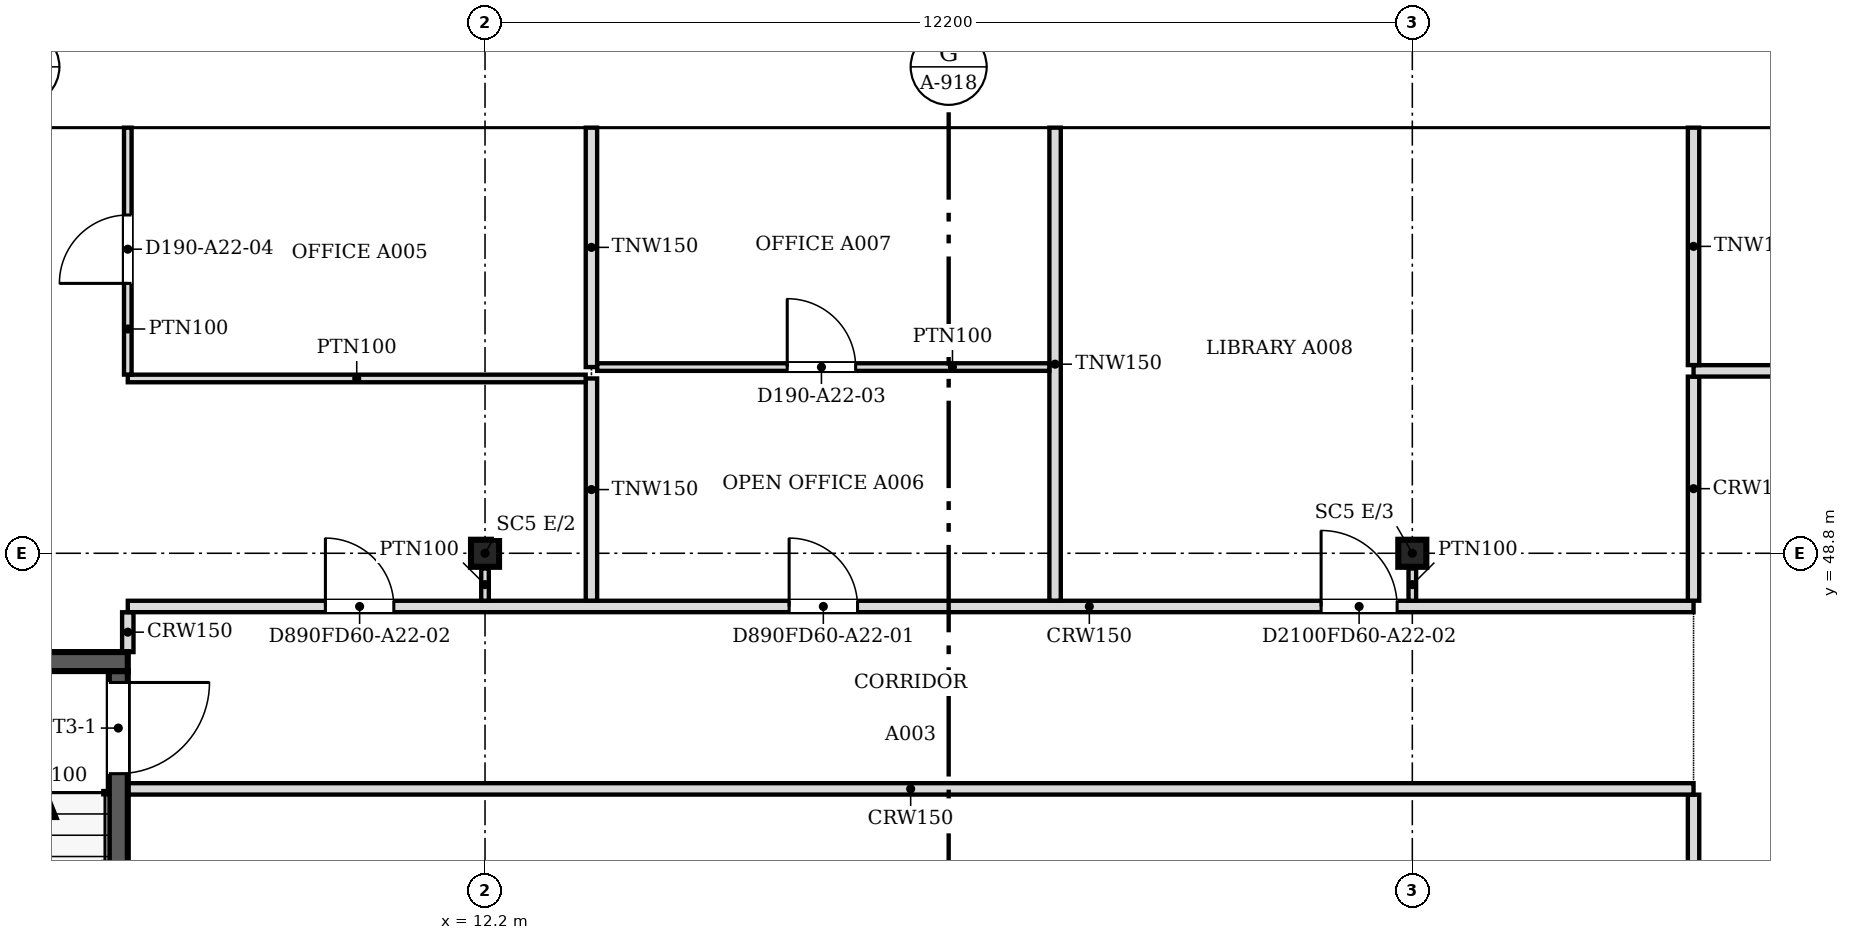
"""IFC4 building model, lengths in metres.
Left out: names, types, materials, properties, quantities, classifications, styles, units other than length and angle.
Written with IfcOpenShell. Run it as: python <this file> out.ifc"""

import sys

from ifc_helpers import new_model, si_unit, direction, frame, frame_2d, origin, origin_2d, place, context, subcontext, project, spatial, polyline, rectangle, i_section, outline, extrude, faceted_brep, source, transform, mapped, element, fill, save


model = new_model("IFC4")
c1 = context("Model", 3, precision=1e-05, world=origin(), true_north=direction((0.0, 1.0)))
c2 = subcontext(c1, "Body", "Model", "MODEL_VIEW")
j1 = project(units=[si_unit("LENGTHUNIT", "METRE"), si_unit("PLANEANGLEUNIT", "RADIAN")], contexts=[c1])
p1 = place(None, origin())
s1 = spatial("IfcSite", under=j1, at=p1, CompositionType="ELEMENT")
p2 = place(p1, origin())
s2 = spatial("IfcBuilding", under=s1, at=p2, CompositionType="ELEMENT")
p3 = place(p2, frame((0.0, 0.0, 252.1)))
s3 = spatial("IfcBuildingStorey", under=s2, at=p3, CompositionType="ELEMENT", Elevation=252.1)
for number, where, z_axis, x_axis in (
    (1, (12.2, 48.8, 0.0), (0.0, 0.0, 1.0), (1.0, 0.0, 0.0)),
    (2, (24.4, 48.8, 0.0), (0.0, 0.0, 1.0), (1.0, 0.0, 0.0)),
):
    element("IfcColumn", number, at=place(p3, frame(where, z_axis=z_axis, x_axis=x_axis)), inside=s3, PredefinedType="COLUMN", context=c2, shape_type="SweptSolid", body=[
        extrude(i_section(OverallWidth=0.369, OverallDepth=0.356, WebThickness=0.011, FlangeThickness=0.018, at=origin_2d()), origin(), (0.0, 0.0, 1.0), 3.6),
    ])
m1 = source(origin(), c2, "Body", "SweptSolid", [
    extrude(outline(polyline([(3.05, 0.0), (6.1, 3.8), (3.05, 7.6), (0.0, 3.8), (3.05, 0.0)])), frame((0.0, 0.25, 0.0), z_axis=(0.0, -1.0, 0.0), x_axis=(1.0, 0.0, 0.0)), (0.0, 0.0, 1.0), 0.5),
])
p4 = place(p3, frame((33.55, 54.65, -3.8), z_axis=(0.0, 0.0, 1.0), x_axis=(-1.0, 0.0, 0.0)))
e3 = element("IfcWall", 3, at=p4, inside=s3, PredefinedType="SOLIDWALL", context=c2, shape_type="MappedRepresentation", body=[
    mapped(m1, transform((0.0, 0.0, 0.0), scale=1.0)),
])
m2 = source(origin(), c2, "Body", "SweptSolid", [
    extrude(outline(polyline([(3.05, 0.399), (5.78, 3.8), (3.05, 7.2), (0.321, 3.8), (3.05, 0.399)])), frame((0.0, 0.26, 0.0), z_axis=(0.0, -1.0, 0.0), x_axis=(1.0, 0.0, 0.0)), (0.0, 0.0, 1.0), 0.52),
])
p5 = place(p4, origin())
e4 = element("IfcOpeningElement", 4, at=p5, cuts=e3, PredefinedType="OPENING", context=c2, shape_type="MappedRepresentation", body=[
    mapped(m2, transform((0.0, 0.0, 0.0), scale=1.0)),
])
m3 = source(origin(), c2, "Body", "Brep", [
    faceted_brep([(3.05, -0.25, 0.0), (6.1, -0.25, 3.8), (6.1, -0.25, 3.8), (3.05, -0.25, 7.6), (0.0, -0.25, 3.8), (0.0, 0.25, 3.8), (3.05, 0.25, 7.6), (6.1, 0.25, 3.8), (6.1, 0.25, 3.8), (3.05, 0.25, 0.0)], [[[0, 1, 2, 3, 4]], [[5, 6, 7, 8, 9]], [[9, 8, 1, 0]], [[7, 6, 3, 2]], [[6, 5, 4, 3]], [[5, 9, 0, 4]], [[1, 8, 7, 2]]]),
])
p6 = place(p3, frame((27.45, 54.65, -3.8), z_axis=(0.0, 0.0, 1.0), x_axis=(-1.0, 0.0, 0.0)))
e5 = element("IfcWall", 5, at=p6, inside=s3, PredefinedType="SOLIDWALL", context=c2, shape_type="MappedRepresentation", body=[
    mapped(m3, transform((0.0, 0.0, 0.0), scale=1.0)),
])
p7 = place(p6, origin())
e6 = element("IfcOpeningElement", 6, at=p7, cuts=e5, PredefinedType="OPENING", context=c2, shape_type="MappedRepresentation", body=[
    mapped(m2, transform((0.0, 0.0, 0.0), scale=1.0)),
])
p8 = place(p3, frame((21.35, 54.65, -3.8), z_axis=(0.0, 0.0, 1.0), x_axis=(-1.0, 0.0, 0.0)))
e7 = element("IfcWall", 7, at=p8, inside=s3, PredefinedType="SOLIDWALL", context=c2, shape_type="MappedRepresentation", body=[
    mapped(m1, transform((0.0, 0.0, 0.0), scale=1.0)),
])
p9 = place(p8, origin())
e8 = element("IfcOpeningElement", 8, at=p9, cuts=e7, PredefinedType="OPENING", context=c2, shape_type="MappedRepresentation", body=[
    mapped(m2, transform((0.0, 0.0, 0.0), scale=1.0)),
])
p10 = place(p3, frame((15.25, 54.65, -3.8), z_axis=(0.0, 0.0, 1.0), x_axis=(-1.0, 0.0, 0.0)))
e9 = element("IfcWall", 9, at=p10, inside=s3, PredefinedType="SOLIDWALL", context=c2, shape_type="MappedRepresentation", body=[
    mapped(m1, transform((0.0, 0.0, 0.0), scale=1.0)),
])
p11 = place(p10, origin())
e10 = element("IfcOpeningElement", 10, at=p11, cuts=e9, PredefinedType="OPENING", context=c2, shape_type="MappedRepresentation", body=[
    mapped(m2, transform((0.0, 0.0, 0.0), scale=1.0)),
])
m4 = source(origin(), c2, "Body", "Brep", [
    faceted_brep([(3.003, -0.25, 0.0), (3.05, -0.25, 0.06), (3.05, -0.25, 7.54), (3.003, -0.25, 7.6), (0.0, -0.25, 3.8), (0.0, 0.25, 3.8), (2.957, 0.25, 7.541), (2.957, 0.25, 0.059), (3.003, 0.0, 0.0), (3.003, 0.0, 7.6)], [[[0, 1, 2, 3, 4]], [[5, 6, 7]], [[1, 0, 8]], [[9, 3, 2]], [[6, 5, 4, 3, 9]], [[5, 7, 8, 0, 4]], [[1, 8, 7, 6, 9, 2]]]),
])
p12 = place(p3, frame((9.15, 54.65, -3.8), z_axis=(0.0, 0.0, 1.0), x_axis=(-1.0, 0.0, 0.0)))
e11 = element("IfcWall", 11, at=p12, inside=s3, PredefinedType="SOLIDWALL", context=c2, shape_type="MappedRepresentation", body=[
    mapped(m4, transform((0.0, 0.0, 0.0), scale=1.0)),
])
m5 = source(origin(), c2, "Body", "SweptSolid", [
    extrude(outline(polyline([(2.803, 6.944), (0.319, 3.8), (2.803, 0.656), (2.803, 6.944)])), frame((0.0, 0.26, 0.0), z_axis=(0.0, -1.0, 0.0), x_axis=(1.0, 0.0, 0.0)), (0.0, 0.0, 1.0), 0.52),
])
p13 = place(p12, origin())
e12 = element("IfcOpeningElement", 12, at=p13, cuts=e11, PredefinedType="OPENING", context=c2, shape_type="MappedRepresentation", body=[
    mapped(m5, transform((0.0, 0.0, 0.0), scale=1.0)),
])
p14 = place(p2, frame((0.0, 0.0, 255.9)))
s4 = spatial("IfcBuildingStorey", under=s2, at=p14, CompositionType="ELEMENT", Elevation=255.9)
m6 = source(origin(), c2, "Body", "SweptSolid", [
    extrude(outline(polyline([(3.05, 0.0), (6.1, 3.8), (3.05, 7.6), (0.0, 3.8), (3.05, 0.0)])), frame((0.0, 0.25, 0.0), z_axis=(0.0, -1.0, 0.0), x_axis=(1.0, 0.0, 0.0)), (0.0, 0.0, 1.0), 0.5),
])
p15 = place(p14, frame((30.5, 54.65, -3.8), z_axis=(0.0, 0.0, 1.0), x_axis=(-1.0, 0.0, 0.0)))
e13 = element("IfcWall", 13, at=p15, inside=s4, PredefinedType="SOLIDWALL", context=c2, shape_type="MappedRepresentation", body=[
    mapped(m6, transform((0.0, 0.0, 0.0), scale=1.0)),
])
m7 = source(origin(), c2, "Body", "SweptSolid", [
    extrude(outline(polyline([(3.05, 0.399), (5.78, 3.8), (3.05, 7.2), (0.321, 3.8), (3.05, 0.399)])), frame((0.0, 0.26, 0.0), z_axis=(0.0, -1.0, 0.0), x_axis=(1.0, 0.0, 0.0)), (0.0, 0.0, 1.0), 0.52),
])
p16 = place(p15, origin())
e14 = element("IfcOpeningElement", 14, at=p16, cuts=e13, PredefinedType="OPENING", context=c2, shape_type="MappedRepresentation", body=[
    mapped(m7, transform((0.0, 0.0, 0.0), scale=1.0)),
])
m8 = source(origin(), c2, "Body", "Brep", [
    faceted_brep([(3.05, -0.25, 0.0), (6.1, -0.25, 3.8), (6.1, -0.25, 3.8), (3.05, -0.25, 7.6), (0.0, -0.25, 3.8), (0.0, 0.25, 3.8), (3.05, 0.25, 7.6), (6.1, 0.25, 3.8), (6.1, 0.25, 3.8), (3.05, 0.25, 0.0)], [[[0, 1, 2, 3, 4]], [[5, 6, 7, 8, 9]], [[9, 8, 1, 0]], [[7, 6, 3, 2]], [[6, 5, 4, 3]], [[5, 9, 0, 4]], [[1, 8, 7, 2]]]),
])
p17 = place(p14, frame((24.4, 54.65, -3.8), z_axis=(0.0, 0.0, 1.0), x_axis=(-1.0, 0.0, 0.0)))
e15 = element("IfcWall", 15, at=p17, inside=s4, PredefinedType="SOLIDWALL", context=c2, shape_type="MappedRepresentation", body=[
    mapped(m8, transform((0.0, 0.0, 0.0), scale=1.0)),
])
p18 = place(p17, origin())
e16 = element("IfcOpeningElement", 16, at=p18, cuts=e15, PredefinedType="OPENING", context=c2, shape_type="MappedRepresentation", body=[
    mapped(m7, transform((0.0, 0.0, 0.0), scale=1.0)),
])
p19 = place(p14, frame((18.3, 54.65, -3.8), z_axis=(0.0, 0.0, 1.0), x_axis=(-1.0, 0.0, 0.0)))
e17 = element("IfcWall", 17, at=p19, inside=s4, PredefinedType="SOLIDWALL", context=c2, shape_type="MappedRepresentation", body=[
    mapped(m6, transform((0.0, 0.0, 0.0), scale=1.0)),
])
p20 = place(p19, origin())
e18 = element("IfcOpeningElement", 18, at=p20, cuts=e17, PredefinedType="OPENING", context=c2, shape_type="MappedRepresentation", body=[
    mapped(m7, transform((0.0, 0.0, 0.0), scale=1.0)),
])
m9 = source(origin(), c2, "Body", "Brep", [
    faceted_brep([(3.05, -0.25, 0.0), (6.053, -0.25, 3.8), (3.05, -0.25, 7.6), (0.0, -0.25, 3.8), (0.0, 0.25, 3.8), (3.05, 0.25, 7.6), (6.007, 0.25, 3.859), (6.007, 0.25, 3.741), (3.05, 0.25, 0.0), (6.053, 0.0, 3.8)], [[[0, 1, 2, 3]], [[4, 5, 6, 7, 8]], [[8, 7, 9, 1, 0]], [[6, 5, 2, 1, 9]], [[5, 4, 3, 2]], [[4, 8, 0, 3]], [[9, 7, 6]]]),
])
p21 = place(p14, frame((12.2, 54.65, -3.8), z_axis=(0.0, 0.0, 1.0), x_axis=(-1.0, 0.0, 0.0)))
e19 = element("IfcWall", 19, at=p21, inside=s4, PredefinedType="SOLIDWALL", context=c2, shape_type="MappedRepresentation", body=[
    mapped(m9, transform((0.0, 0.0, 0.0), scale=1.0)),
])
m10 = source(origin(), c2, "Body", "SweptSolid", [
    extrude(outline(polyline([(3.049, 0.401), (5.735, 3.8), (3.049, 7.199), (0.321, 3.8), (3.049, 0.401)])), frame((0.0, 0.26, 0.0), z_axis=(0.0, -1.0, 0.0), x_axis=(1.0, 0.0, 0.0)), (0.0, 0.0, 1.0), 0.52),
])
p22 = place(p21, origin())
e20 = element("IfcOpeningElement", 20, at=p22, cuts=e19, PredefinedType="OPENING", context=c2, shape_type="MappedRepresentation", body=[
    mapped(m10, transform((0.0, 0.0, 0.0), scale=1.0)),
])
p23 = place(p3, frame((3.6, 47.375, 0.0), z_axis=(0.0, 0.0, 1.0), x_axis=(1.0, 0.0, 0.0)))
e21 = element("IfcWall", 21, at=p23, inside=s3, PredefinedType="SOLIDWALL", context=c2, shape_type="SweptSolid", body=[
    extrude(rectangle(XDim=3.9, YDim=0.25, at=frame_2d((1.95, 0.0))), origin(), (0.0, 0.0, 1.0), 3.8),
])
p24 = place(p3, frame((7.375, 47.25, 0.0), z_axis=(0.0, 0.0, 1.0), x_axis=(0.0, -1.0, 0.0)))
e22 = element("IfcWall", 22, at=p24, inside=s3, PredefinedType="SOLIDWALL", context=c2, shape_type="SweptSolid", body=[
    extrude(rectangle(XDim=8.0, YDim=0.25, at=frame_2d((4.0, 0.0))), origin(), (0.0, 0.0, 1.0), 3.8),
])
m11 = source(origin(), c2, "Body", "SweptSolid", [
    extrude(rectangle(XDim=1.2, YDim=2.1, at=frame_2d((0.6, 1.05))), frame((0.0, 0.135, 0.0), z_axis=(0.0, -1.0, 0.0), x_axis=(1.0, 0.0, 0.0)), (0.0, 0.0, 1.0), 0.27),
])
p25 = place(p24, frame((0.15, 0.0, 0.0)))
e23 = element("IfcOpeningElement", 23, at=p25, cuts=e22, PredefinedType="OPENING", context=c2, shape_type="MappedRepresentation", body=[
    mapped(m11, transform((0.0, 0.0, 0.0), scale=1.0)),
])
p26 = place(p3, frame((28.1, 22.076, 0.0), z_axis=(0.0, 0.0, 1.0), x_axis=(0.0, 1.0, 0.0)))
e24 = element("IfcWall", 24, at=p26, inside=s3, PredefinedType="PARTITIONING", context=c2, shape_type="SweptSolid", body=[
    extrude(rectangle(XDim=23.548, YDim=0.15, at=frame_2d((11.774, 0.0))), origin(), (0.0, 0.0, 1.0), 3.067),
])
m12 = source(origin(), c2, "Body", "SweptSolid", [
    extrude(rectangle(XDim=1.0, YDim=2.1, at=frame_2d((0.5, 1.05))), frame((0.0, 0.085, 0.0), z_axis=(0.0, -1.0, 0.0), x_axis=(1.0, 0.0, 0.0)), (0.0, 0.0, 1.0), 0.17),
])
p27 = place(p26, frame((2.5, 0.0, 0.0)))
e25 = element("IfcOpeningElement", 25, at=p27, cuts=e24, PredefinedType="OPENING", context=c2, shape_type="MappedRepresentation", body=[
    mapped(m12, transform((0.0, 0.0, 0.0), scale=1.0)),
])
m13 = source(origin(), c2, "Body", "SweptSolid", [
    extrude(rectangle(XDim=0.9, YDim=2.1, at=frame_2d((0.45, 1.05))), frame((0.0, 0.085, 0.0), z_axis=(0.0, -1.0, 0.0), x_axis=(1.0, 0.0, 0.0)), (0.0, 0.0, 1.0), 0.17),
])
p28 = place(p26, frame((18.875, 0.0, 0.0)))
e26 = element("IfcOpeningElement", 26, at=p28, cuts=e24, PredefinedType="OPENING", context=c2, shape_type="MappedRepresentation", body=[
    mapped(m13, transform((0.0, 0.0, 0.0), scale=1.0)),
])
p29 = place(p26, frame((10.124, 0.0, 0.0)))
e27 = element("IfcOpeningElement", 27, at=p29, cuts=e24, PredefinedType="OPENING", context=c2, shape_type="MappedRepresentation", body=[
    mapped(m13, transform((0.0, 0.0, 0.0), scale=1.0)),
])
p30 = place(p3, frame((7.5, 45.7, 0.0), z_axis=(0.0, 0.0, 1.0), x_axis=(1.0, 0.0, 0.0)))
e28 = element("IfcWall", 28, at=p30, inside=s3, PredefinedType="PARTITIONING", context=c2, shape_type="SweptSolid", body=[
    extrude(rectangle(XDim=20.6, YDim=0.15, at=frame_2d((10.3, 0.0))), origin(), (0.0, 0.0, 1.0), 3.067),
])
p31 = place(p3, frame((7.5, 47.5, 0.0), z_axis=(0.0, 0.0, 1.0), x_axis=(0.0, 1.0, 0.0)))
e29 = element("IfcWall", 29, at=p31, inside=s3, PredefinedType="PARTITIONING", context=c2, shape_type="SweptSolid", body=[
    extrude(rectangle(XDim=0.524, YDim=0.15, at=frame_2d((0.262, 0.0))), origin(), (0.0, 0.0, 1.0), 3.067),
])
p32 = place(p3, frame((7.5, 48.1, 0.0), z_axis=(0.0, 0.0, 1.0), x_axis=(1.0, 0.0, 0.0)))
e30 = element("IfcWall", 30, at=p32, inside=s3, PredefinedType="PARTITIONING", context=c2, shape_type="SweptSolid", body=[
    extrude(rectangle(XDim=20.6, YDim=0.15, at=frame_2d((10.3, 0.0))), origin(), (0.0, 0.0, 1.0), 3.067),
])
p33 = place(p32, frame((8.701, 0.0, 0.0)))
e31 = element("IfcOpeningElement", 31, at=p33, cuts=e30, PredefinedType="OPENING", context=c2, shape_type="MappedRepresentation", body=[
    mapped(m13, transform((0.0, 0.0, 0.0), scale=1.0)),
])
p34 = place(p32, frame((2.6, 0.0, 0.0)))
e32 = element("IfcOpeningElement", 32, at=p34, cuts=e30, PredefinedType="OPENING", context=c2, shape_type="MappedRepresentation", body=[
    mapped(m13, transform((0.0, 0.0, 0.0), scale=1.0)),
])
p35 = place(p32, frame((15.7, 0.0, 0.0)))
e33 = element("IfcOpeningElement", 33, at=p35, cuts=e30, PredefinedType="OPENING", context=c2, shape_type="MappedRepresentation", body=[
    mapped(m12, transform((0.0, 0.0, 0.0), scale=1.0)),
])
p36 = place(p3, frame((13.6, 48.176, 0.0), z_axis=(0.0, 0.0, 1.0), x_axis=(0.0, 1.0, 0.0)))
e34 = element("IfcWall", 34, at=p36, inside=s3, PredefinedType="PARTITIONING", context=c2, shape_type="SweptSolid", body=[
    extrude(rectangle(XDim=2.924, YDim=0.15, at=frame_2d((1.462, 0.0))), origin(), (0.0, 0.0, 1.0), 3.067),
])
p37 = place(p3, frame((19.7, 48.176, 0.0), z_axis=(0.0, 0.0, 1.0), x_axis=(0.0, 1.0, 0.0)))
e35 = element("IfcWall", 35, at=p37, inside=s3, PredefinedType="PARTITIONING", context=c2, shape_type="SweptSolid", body=[
    extrude(rectangle(XDim=6.224, YDim=0.15, at=frame_2d((3.112, 0.0))), origin(), (0.0, 0.0, 1.0), 3.067),
])
p38 = place(p3, frame((28.1, 48.176, 0.0), z_axis=(0.0, 0.0, 1.0), x_axis=(0.0, 1.0, 0.0)))
e36 = element("IfcWall", 36, at=p38, inside=s3, PredefinedType="PARTITIONING", context=c2, shape_type="SweptSolid", body=[
    extrude(rectangle(XDim=2.948, YDim=0.15, at=frame_2d((1.474, 0.0))), origin(), (0.0, 0.0, 1.0), 3.067),
])
for number, where, z_axis, x_axis in (
    (37, (12.2, 48.6, 0.0), (0.0, 0.0, 1.0), (0.0, -1.0, 0.0)),
    (38, (24.4, 48.6, 0.0), (0.0, 0.0, 1.0), (0.0, -1.0, 0.0)),
):
    element("IfcWall", number, at=place(p3, frame(where, z_axis=z_axis, x_axis=x_axis)), inside=s3, PredefinedType="PARTITIONING", context=c2, shape_type="SweptSolid", body=[
        extrude(rectangle(XDim=0.425, YDim=0.1, at=frame_2d((0.212, 0.0))), origin(), (0.0, 0.0, 1.0), 3.067),
    ])
p39 = place(p3, frame((7.5, 51.1, 0.0), z_axis=(0.0, 0.0, 1.0), x_axis=(1.0, 0.0, 0.0)))
e39 = element("IfcWall", 39, at=p39, inside=s3, PredefinedType="PARTITIONING", context=c2, shape_type="SweptSolid", body=[
    extrude(rectangle(XDim=6.024, YDim=0.1, at=frame_2d((3.012, 0.0))), origin(), (0.0, 0.0, 1.0), 3.067),
])
p40 = place(p3, frame((7.5, 54.4, 0.0), z_axis=(0.0, 0.0, 1.0), x_axis=(0.0, -1.0, 0.0)))
e40 = element("IfcWall", 40, at=p40, inside=s3, PredefinedType="PARTITIONING", context=c2, shape_type="SweptSolid", body=[
    extrude(rectangle(XDim=3.249, YDim=0.1, at=frame_2d((1.625, 0.0))), origin(), (0.0, 0.0, 1.0), 3.067),
])
m14 = source(origin(), c2, "Body", "SweptSolid", [
    extrude(rectangle(XDim=0.9, YDim=2.1, at=frame_2d((0.45, 1.05))), frame((0.0, 0.06, 0.0), z_axis=(0.0, -1.0, 0.0), x_axis=(1.0, 0.0, 0.0)), (0.0, 0.0, 1.0), 0.12),
])
p41 = place(p40, frame((1.149, 0.0, 0.0)))
e41 = element("IfcOpeningElement", 41, at=p41, cuts=e40, PredefinedType="OPENING", context=c2, shape_type="MappedRepresentation", body=[
    mapped(m14, transform((0.0, 0.0, 0.0), scale=1.0)),
])
p42 = place(p3, frame((28.1, 51.2, 0.0), z_axis=(0.0, 0.0, 1.0), x_axis=(1.0, 0.0, 0.0)))
e42 = element("IfcWall", 42, at=p42, inside=s3, PredefinedType="PARTITIONING", context=c2, shape_type="SweptSolid", body=[
    extrude(rectangle(XDim=31.438, YDim=0.15, at=frame_2d((15.719, 0.0))), origin(), (0.0, 0.0, 1.0), 3.067),
])
p43 = place(p42, frame((5.6, 0.0, 0.0)))
e43 = element("IfcOpeningElement", 43, at=p43, cuts=e42, PredefinedType="OPENING", context=c2, shape_type="MappedRepresentation", body=[
    mapped(m13, transform((0.0, 0.0, 0.0), scale=1.0)),
])
p44 = place(p42, frame((21.4, 0.0, 0.0)))
e44 = element("IfcOpeningElement", 44, at=p44, cuts=e42, PredefinedType="OPENING", context=c2, shape_type="MappedRepresentation", body=[
    mapped(m13, transform((0.0, 0.0, 0.0), scale=1.0)),
])
p45 = place(p3, frame((13.6, 51.25, 0.0), z_axis=(0.0, 0.0, 1.0), x_axis=(0.0, 1.0, 0.0)))
e45 = element("IfcWall", 45, at=p45, inside=s3, PredefinedType="PARTITIONING", context=c2, shape_type="SweptSolid", body=[
    extrude(rectangle(XDim=3.15, YDim=0.15, at=frame_2d((1.575, 0.0))), origin(), (0.0, 0.0, 1.0), 3.067),
])
p46 = place(p3, frame((13.676, 51.25, 0.0), z_axis=(0.0, 0.0, 1.0), x_axis=(1.0, 0.0, 0.0)))
e46 = element("IfcWall", 46, at=p46, inside=s3, PredefinedType="PARTITIONING", context=c2, shape_type="SweptSolid", body=[
    extrude(rectangle(XDim=5.948, YDim=0.1, at=frame_2d((2.974, 0.0))), origin(), (0.0, 0.0, 1.0), 3.067),
])
p47 = place(p46, frame((2.5, 0.0, 0.0)))
e47 = element("IfcOpeningElement", 47, at=p47, cuts=e46, PredefinedType="OPENING", context=c2, shape_type="MappedRepresentation", body=[
    mapped(m14, transform((0.0, 0.0, 0.0), scale=1.0)),
])
p48 = place(p3, frame((28.1, 51.276, 0.0), z_axis=(0.0, 0.0, 1.0), x_axis=(0.0, 1.0, 0.0)))
e48 = element("IfcWall", 48, at=p48, inside=s3, PredefinedType="PARTITIONING", context=c2, shape_type="SweptSolid", body=[
    extrude(rectangle(XDim=3.124, YDim=0.15, at=frame_2d((1.562, 0.0))), origin(), (0.0, 0.0, 1.0), 3.067),
])
m15 = source(origin(), c2, "Body", "SweptSolid", [
    extrude(rectangle(XDim=1.2, YDim=2.1, at=frame_2d((0.6, 1.05))), frame((0.0, 0.025, 0.0), z_axis=(0.0, -1.0, 0.0), x_axis=(1.0, 0.0, 0.0)), (0.0, 0.0, 1.0), 0.05),
])
p49 = place(p25, origin())
e49 = element("IfcDoor", 49, at=p49, inside=s3, OperationType="SINGLE_SWING_LEFT", PredefinedType="DOOR", context=c2, shape_type="MappedRepresentation", body=[
    mapped(m15, transform((0.0, 0.0, 0.0), scale=1.0)),
])
fill(e23, e49)
m16 = source(origin(), c2, "Body", "SweptSolid", [
    extrude(rectangle(XDim=0.9, YDim=2.1, at=frame_2d((0.45, 1.05))), frame((0.0, 0.025, 0.0), z_axis=(0.0, -1.0, 0.0), x_axis=(1.0, 0.0, 0.0)), (0.0, 0.0, 1.0), 0.05),
])
p50 = place(p47, origin())
e50 = element("IfcDoor", 50, at=p50, inside=s3, OperationType="SINGLE_SWING_LEFT", PredefinedType="DOOR", context=c2, shape_type="MappedRepresentation", body=[
    mapped(m16, transform((0.0, 0.0, 0.0), scale=1.0)),
])
fill(e47, e50)
p51 = place(p33, origin())
e51 = element("IfcDoor", 51, at=p51, inside=s3, OperationType="SINGLE_SWING_LEFT", PredefinedType="DOOR", context=c2, shape_type="MappedRepresentation", body=[
    mapped(m16, transform((0.0, 0.0, 0.0), scale=1.0)),
])
fill(e31, e51)
p52 = place(p34, origin())
e52 = element("IfcDoor", 52, at=p52, inside=s3, OperationType="SINGLE_SWING_LEFT", PredefinedType="DOOR", context=c2, shape_type="MappedRepresentation", body=[
    mapped(m16, transform((0.0, 0.0, 0.0), scale=1.0)),
])
fill(e32, e52)
m17 = source(origin(), c2, "Body", "SweptSolid", [
    extrude(rectangle(XDim=1.0, YDim=2.1, at=frame_2d((0.5, 1.05))), frame((0.0, 0.025, 0.0), z_axis=(0.0, -1.0, 0.0), x_axis=(1.0, 0.0, 0.0)), (0.0, 0.0, 1.0), 0.05),
])
p53 = place(p35, origin())
e53 = element("IfcDoor", 53, at=p53, inside=s3, OperationType="SINGLE_SWING_LEFT", PredefinedType="DOOR", context=c2, shape_type="MappedRepresentation", body=[
    mapped(m17, transform((0.0, 0.0, 0.0), scale=1.0)),
])
fill(e33, e53)
p54 = place(p41, origin())
e54 = element("IfcDoor", 54, at=p54, inside=s3, OperationType="SINGLE_SWING_RIGHT", PredefinedType="DOOR", context=c2, shape_type="MappedRepresentation", body=[
    mapped(m16, transform((0.0, 0.0, 0.0), scale=1.0)),
])
fill(e41, e54)
save(model, sys.argv[1])
